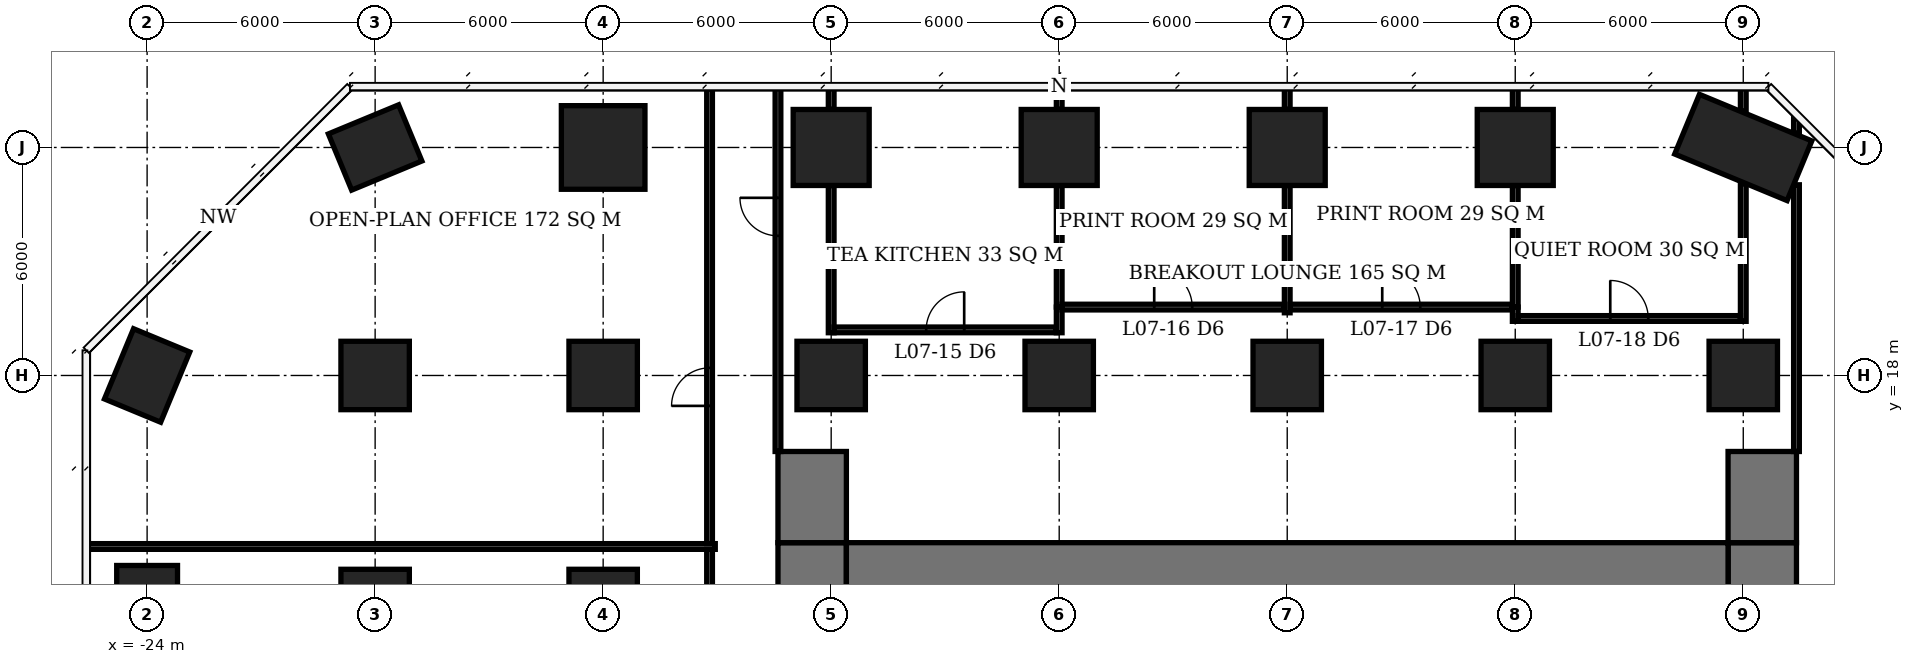
"""IFC4 building model, lengths in metres.
Left out: names, types, materials, properties, quantities, classifications, styles, units other than length and angle.
Written with IfcOpenShell. Run it as: python <this file> out.ifc"""

import sys

from ifc_helpers import new_model, si_unit, direction, frame, frame_2d, origin, origin_2d, place, context, subcontext, project, spatial, rectangle, extrude, element, fill, save


model = new_model("IFC4")
c1 = context("Model", 3, precision=1e-05, world=origin(), true_north=direction((0.0, 1.0)))
c2 = subcontext(c1, "Body", "Model", "MODEL_VIEW")
j1 = project(units=[si_unit("LENGTHUNIT", "METRE"), si_unit("PLANEANGLEUNIT", "RADIAN")], contexts=[c1])
p1 = place(None, origin())
s1 = spatial("IfcSite", under=j1, at=p1, CompositionType="ELEMENT")
p2 = place(p1, origin())
s2 = spatial("IfcBuilding", under=s1, at=p2, CompositionType="ELEMENT")
p3 = place(p2, frame((0.0, 0.0, 33.8)))
s3 = spatial("IfcBuildingStorey", under=s2, at=p3, CompositionType="ELEMENT", Elevation=33.8)
for number, where, z_axis, x_axis in (
    (1, (-24.0, 12.0, 0.0), (0.0, 0.0, 1.0), (0.0, 1.0, 0.0)),
    (2, (-24.0, 18.0, 0.0), (0.0, 0.0, 1.0), (0.383, 0.924, 0.0)),
):
    element("IfcColumn", number, at=place(p3, frame(where, z_axis=z_axis, x_axis=x_axis)), inside=s3, PredefinedType="COLUMN", context=c2, shape_type="SweptSolid", body=[
        extrude(rectangle(XDim=2.0, YDim=1.6, at=origin_2d()), origin(), (0.0, 0.0, 1.0), 3.9),
    ])
for number, where, z_axis, x_axis in (
    (3, (-18.0, 12.0, 0.0), (0.0, 0.0, 1.0), (1.0, 0.0, 0.0)),
    (4, (-18.0, 18.0, 0.0), (0.0, 0.0, 1.0), (1.0, 0.0, 0.0)),
):
    element("IfcColumn", number, at=place(p3, frame(where, z_axis=z_axis, x_axis=x_axis)), inside=s3, PredefinedType="COLUMN", context=c2, shape_type="SweptSolid", body=[
        extrude(rectangle(XDim=1.8, YDim=1.8, at=origin_2d()), origin(), (0.0, 0.0, 1.0), 3.9),
    ])
p4 = place(p3, frame((-18.0, 24.0, 0.0), z_axis=(0.0, 0.0, 1.0), x_axis=(0.923879532511, 0.382683432365, 0.0)))
e5 = element("IfcColumn", 5, at=p4, inside=s3, PredefinedType="COLUMN", context=c2, shape_type="SweptSolid", body=[
    extrude(rectangle(XDim=2.0, YDim=1.6, at=origin_2d()), origin(), (0.0, 0.0, 1.0), 3.9),
])
for number, where, z_axis, x_axis in (
    (6, (-12.0, 12.0, 0.0), (0.0, 0.0, 1.0), (1.0, 0.0, 0.0)),
    (7, (-12.0, 18.0, 0.0), (0.0, 0.0, 1.0), (1.0, 0.0, 0.0)),
):
    element("IfcColumn", number, at=place(p3, frame(where, z_axis=z_axis, x_axis=x_axis)), inside=s3, PredefinedType="COLUMN", context=c2, shape_type="SweptSolid", body=[
        extrude(rectangle(XDim=1.8, YDim=1.8, at=origin_2d()), origin(), (0.0, 0.0, 1.0), 3.9),
    ])
p5 = place(p3, frame((-12.0, 24.0, 0.0), z_axis=(0.0, 0.0, 1.0), x_axis=(1.0, 0.0, 0.0)))
e8 = element("IfcColumn", 8, at=p5, inside=s3, PredefinedType="COLUMN", context=c2, shape_type="SweptSolid", body=[
    extrude(rectangle(XDim=2.2, YDim=2.2, at=origin_2d()), origin(), (0.0, 0.0, 1.0), 3.9),
])
p6 = place(p3, frame((-6.0, 18.0, 0.0), z_axis=(0.0, 0.0, 1.0), x_axis=(1.0, 0.0, 0.0)))
e9 = element("IfcColumn", 9, at=p6, inside=s3, PredefinedType="COLUMN", context=c2, shape_type="SweptSolid", body=[
    extrude(rectangle(XDim=1.8, YDim=1.8, at=origin_2d()), origin(), (0.0, 0.0, 1.0), 3.9),
])
p7 = place(p3, frame((-6.0, 24.0, 0.0), z_axis=(0.0, 0.0, 1.0), x_axis=(1.0, 0.0, 0.0)))
e10 = element("IfcColumn", 10, at=p7, inside=s3, PredefinedType="COLUMN", context=c2, shape_type="SweptSolid", body=[
    extrude(rectangle(XDim=2.0, YDim=2.0, at=origin_2d()), origin(), (0.0, 0.0, 1.0), 3.9),
])
p8 = place(p3, frame((0.0, 18.0, 0.0), z_axis=(0.0, 0.0, 1.0), x_axis=(1.0, 0.0, 0.0)))
e11 = element("IfcColumn", 11, at=p8, inside=s3, PredefinedType="COLUMN", context=c2, shape_type="SweptSolid", body=[
    extrude(rectangle(XDim=1.8, YDim=1.8, at=origin_2d()), origin(), (0.0, 0.0, 1.0), 3.9),
])
p9 = place(p3, frame((0.0, 24.0, 0.0), z_axis=(0.0, 0.0, 1.0), x_axis=(1.0, 0.0, 0.0)))
e12 = element("IfcColumn", 12, at=p9, inside=s3, PredefinedType="COLUMN", context=c2, shape_type="SweptSolid", body=[
    extrude(rectangle(XDim=2.0, YDim=2.0, at=origin_2d()), origin(), (0.0, 0.0, 1.0), 3.9),
])
p10 = place(p3, frame((6.0, 18.0, 0.0), z_axis=(0.0, 0.0, 1.0), x_axis=(1.0, 0.0, 0.0)))
e13 = element("IfcColumn", 13, at=p10, inside=s3, PredefinedType="COLUMN", context=c2, shape_type="SweptSolid", body=[
    extrude(rectangle(XDim=1.8, YDim=1.8, at=origin_2d()), origin(), (0.0, 0.0, 1.0), 3.9),
])
p11 = place(p3, frame((6.0, 24.0, 0.0), z_axis=(0.0, 0.0, 1.0), x_axis=(1.0, 0.0, 0.0)))
e14 = element("IfcColumn", 14, at=p11, inside=s3, PredefinedType="COLUMN", context=c2, shape_type="SweptSolid", body=[
    extrude(rectangle(XDim=2.0, YDim=2.0, at=origin_2d()), origin(), (0.0, 0.0, 1.0), 3.9),
])
p12 = place(p3, frame((12.0, 18.0, 0.0), z_axis=(0.0, 0.0, 1.0), x_axis=(1.0, 0.0, 0.0)))
e15 = element("IfcColumn", 15, at=p12, inside=s3, PredefinedType="COLUMN", context=c2, shape_type="SweptSolid", body=[
    extrude(rectangle(XDim=1.8, YDim=1.8, at=origin_2d()), origin(), (0.0, 0.0, 1.0), 3.9),
])
p13 = place(p3, frame((12.0, 24.0, 0.0), z_axis=(0.0, 0.0, 1.0), x_axis=(1.0, 0.0, 0.0)))
e16 = element("IfcColumn", 16, at=p13, inside=s3, PredefinedType="COLUMN", context=c2, shape_type="SweptSolid", body=[
    extrude(rectangle(XDim=2.0, YDim=2.0, at=origin_2d()), origin(), (0.0, 0.0, 1.0), 3.9),
])
p14 = place(p3, frame((18.0, 18.0, 0.0), z_axis=(0.0, 0.0, 1.0), x_axis=(1.0, 0.0, 0.0)))
e17 = element("IfcColumn", 17, at=p14, inside=s3, PredefinedType="COLUMN", context=c2, shape_type="SweptSolid", body=[
    extrude(rectangle(XDim=1.8, YDim=1.8, at=origin_2d()), origin(), (0.0, 0.0, 1.0), 3.9),
])
p15 = place(p3, frame((18.0, 24.0, 0.0), z_axis=(0.0, 0.0, 1.0), x_axis=(0.923879532511, -0.382683432365, 0.0)))
e18 = element("IfcColumn", 18, at=p15, inside=s3, PredefinedType="COLUMN", context=c2, shape_type="SweptSolid", body=[
    extrude(rectangle(XDim=3.2, YDim=1.7, at=origin_2d()), origin(), (0.0, 0.0, 1.0), 3.9),
])
p16 = place(p3, frame((-5.6, 12.6, 0.0), z_axis=(0.0, 0.0, 1.0), x_axis=(1.0, 0.0, 0.0)))
e19 = element("IfcWall", 19, at=p16, inside=s3, PredefinedType="SHEAR", context=c2, shape_type="SweptSolid", body=[
    extrude(rectangle(XDim=23.2, YDim=2.0, at=frame_2d((11.6, 0.0))), origin(), (0.0, 0.0, 1.0), 3.9),
])
p17 = place(p3, frame((-6.5, -7.6, 0.0), z_axis=(0.0, 0.0, 1.0), x_axis=(0.0, 1.0, 0.0)))
e20 = element("IfcWall", 20, at=p17, inside=s3, PredefinedType="SHEAR", context=c2, shape_type="SweptSolid", body=[
    extrude(rectangle(XDim=21.2, YDim=1.8, at=frame_2d((10.6, 0.0))), origin(), (0.0, 0.0, 1.0), 3.9),
])
p18 = place(p17, frame((7.8, 0.0, 0.0)))
e21 = element("IfcOpeningElement", 21, at=p18, cuts=e20, PredefinedType="OPENING", context=c2, shape_type="SweptSolid", body=[
    extrude(rectangle(XDim=1.8, YDim=2.4, at=frame_2d((0.9, 1.2))), frame((0.0, 0.91, 0.0), z_axis=(0.0, -1.0, 0.0), x_axis=(1.0, 0.0, 0.0)), (0.0, 0.0, 1.0), 1.82),
])
p19 = place(p3, frame((18.5, -7.6, 0.0), z_axis=(0.0, 0.0, 1.0), x_axis=(0.0, 1.0, 0.0)))
e22 = element("IfcWall", 22, at=p19, inside=s3, PredefinedType="SHEAR", context=c2, shape_type="SweptSolid", body=[
    extrude(rectangle(XDim=21.2, YDim=1.8, at=frame_2d((10.6, 0.0))), origin(), (0.0, 0.0, 1.0), 3.9),
])
p20 = place(p19, frame((9.2, 0.0, 0.0)))
e23 = element("IfcOpeningElement", 23, at=p20, cuts=e22, PredefinedType="OPENING", context=c2, shape_type="SweptSolid", body=[
    extrude(rectangle(XDim=1.8, YDim=2.4, at=frame_2d((0.9, 1.2))), frame((0.0, 0.91, 0.0), z_axis=(0.0, -1.0, 0.0), x_axis=(1.0, 0.0, 0.0)), (0.0, 0.0, 1.0), 1.82),
])
for number, where, z_axis, x_axis in (
    (24, (-6.5, 13.6, 0.0), (0.0, 0.0, 1.0), (0.0, 1.0, 0.0)),
    (25, (18.5, 13.6, 0.0), (0.0, 0.0, 1.0), (0.0, 1.0, 0.0)),
):
    element("IfcWall", number, at=place(p3, frame(where, z_axis=z_axis, x_axis=x_axis)), inside=s3, PredefinedType="SHEAR", context=c2, shape_type="SweptSolid", body=[
        extrude(rectangle(XDim=2.4, YDim=1.8, at=frame_2d((1.2, 0.0))), origin(), (0.0, 0.0, 1.0), 3.9),
    ])
p21 = place(p3, frame((-5.925, 19.2, 0.0), z_axis=(0.0, 0.0, 1.0), x_axis=(1.0, 0.0, 0.0)))
e26 = element("IfcWall", 26, at=p21, inside=s3, PredefinedType="PARTITIONING", context=c2, shape_type="SweptSolid", body=[
    extrude(rectangle(XDim=5.85, YDim=0.15, at=frame_2d((2.925, 0.0))), origin(), (0.0, 0.0, 1.0), 3.65),
])
p22 = place(p21, frame((2.425, 0.0, 0.0)))
e27 = element("IfcOpeningElement", 27, at=p22, cuts=e26, PredefinedType="OPENING", context=c2, shape_type="SweptSolid", body=[
    extrude(rectangle(XDim=1.0, YDim=2.1, at=frame_2d((0.5, 1.05))), frame((0.0, 0.085, 0.0), z_axis=(0.0, -1.0, 0.0), x_axis=(1.0, 0.0, 0.0)), (0.0, 0.0, 1.0), 0.17),
])
p23 = place(p3, frame((12.075, 19.5, 0.0), z_axis=(0.0, 0.0, 1.0), x_axis=(1.0, 0.0, 0.0)))
e28 = element("IfcWall", 28, at=p23, inside=s3, PredefinedType="PARTITIONING", context=c2, shape_type="SweptSolid", body=[
    extrude(rectangle(XDim=5.85, YDim=0.15, at=frame_2d((2.925, 0.0))), origin(), (0.0, 0.0, 1.0), 3.65),
])
p24 = place(p23, frame((2.425, 0.0, 0.0)))
e29 = element("IfcOpeningElement", 29, at=p24, cuts=e28, PredefinedType="OPENING", context=c2, shape_type="SweptSolid", body=[
    extrude(rectangle(XDim=1.0, YDim=2.1, at=frame_2d((0.5, 1.05))), frame((0.0, 0.085, 0.0), z_axis=(0.0, -1.0, 0.0), x_axis=(1.0, 0.0, 0.0)), (0.0, 0.0, 1.0), 0.17),
])
p25 = place(p3, frame((0.075, 19.8, 0.0), z_axis=(0.0, 0.0, 1.0), x_axis=(1.0, 0.0, 0.0)))
e30 = element("IfcWall", 30, at=p25, inside=s3, PredefinedType="PARTITIONING", context=c2, shape_type="SweptSolid", body=[
    extrude(rectangle(XDim=5.85, YDim=0.15, at=frame_2d((2.925, 0.0))), origin(), (0.0, 0.0, 1.0), 3.65),
])
p26 = place(p25, frame((2.425, 0.0, 0.0)))
e31 = element("IfcOpeningElement", 31, at=p26, cuts=e30, PredefinedType="OPENING", context=c2, shape_type="SweptSolid", body=[
    extrude(rectangle(XDim=1.0, YDim=2.1, at=frame_2d((0.5, 1.05))), frame((0.0, 0.085, 0.0), z_axis=(0.0, -1.0, 0.0), x_axis=(1.0, 0.0, 0.0)), (0.0, 0.0, 1.0), 0.17),
])
p27 = place(p3, frame((6.075, 19.8, 0.0), z_axis=(0.0, 0.0, 1.0), x_axis=(1.0, 0.0, 0.0)))
e32 = element("IfcWall", 32, at=p27, inside=s3, PredefinedType="PARTITIONING", context=c2, shape_type="SweptSolid", body=[
    extrude(rectangle(XDim=5.85, YDim=0.15, at=frame_2d((2.925, 0.0))), origin(), (0.0, 0.0, 1.0), 3.65),
])
p28 = place(p27, frame((2.425, 0.0, 0.0)))
e33 = element("IfcOpeningElement", 33, at=p28, cuts=e32, PredefinedType="OPENING", context=c2, shape_type="SweptSolid", body=[
    extrude(rectangle(XDim=1.0, YDim=2.1, at=frame_2d((0.5, 1.05))), frame((0.0, 0.085, 0.0), z_axis=(0.0, -1.0, 0.0), x_axis=(1.0, 0.0, 0.0)), (0.0, 0.0, 1.0), 0.17),
])
p29 = place(p3, frame((-6.0, 19.125, 0.0), z_axis=(0.0, 0.0, 1.0), x_axis=(0.0, 1.0, 0.0)))
e34 = element("IfcWall", 34, at=p29, inside=s3, PredefinedType="PARTITIONING", context=c2, shape_type="SweptSolid", body=[
    extrude(rectangle(XDim=3.875, YDim=0.15, at=frame_2d((1.938, 0.0))), origin(), (0.0, 0.0, 1.0), 3.65),
])
p30 = place(p3, frame((-6.0, 25.0, 0.0), z_axis=(0.0, 0.0, 1.0), x_axis=(0.0, 1.0, 0.0)))
e35 = element("IfcWall", 35, at=p30, inside=s3, PredefinedType="PARTITIONING", context=c2, shape_type="SweptSolid", body=[
    extrude(rectangle(XDim=0.6, YDim=0.15, at=frame_2d((0.3, 0.0))), origin(), (0.0, 0.0, 1.0), 3.65),
])
p31 = place(p3, frame((0.0, 19.125, 0.0), z_axis=(0.0, 0.0, 1.0), x_axis=(0.0, 1.0, 0.0)))
e36 = element("IfcWall", 36, at=p31, inside=s3, PredefinedType="PARTITIONING", context=c2, shape_type="SweptSolid", body=[
    extrude(rectangle(XDim=0.675, YDim=0.15, at=frame_2d((0.337, 0.0))), origin(), (0.0, 0.0, 1.0), 3.65),
])
p32 = place(p3, frame((0.0, 19.8, 0.0), z_axis=(0.0, 0.0, 1.0), x_axis=(0.0, 1.0, 0.0)))
e37 = element("IfcWall", 37, at=p32, inside=s3, PredefinedType="PARTITIONING", context=c2, shape_type="SweptSolid", body=[
    extrude(rectangle(XDim=3.2, YDim=0.15, at=frame_2d((1.6, 0.0))), origin(), (0.0, 0.0, 1.0), 3.65),
])
p33 = place(p3, frame((0.0, 25.0, 0.0), z_axis=(0.0, 0.0, 1.0), x_axis=(0.0, 1.0, 0.0)))
e38 = element("IfcWall", 38, at=p33, inside=s3, PredefinedType="PARTITIONING", context=c2, shape_type="SweptSolid", body=[
    extrude(rectangle(XDim=0.55, YDim=0.15, at=frame_2d((0.275, 0.0))), origin(), (0.0, 0.0, 1.0), 3.65),
])
p34 = place(p3, frame((6.0, 19.65, 0.0), z_axis=(0.0, 0.0, 1.0), x_axis=(0.0, 1.0, 0.0)))
e39 = element("IfcWall", 39, at=p34, inside=s3, PredefinedType="PARTITIONING", context=c2, shape_type="SweptSolid", body=[
    extrude(rectangle(XDim=3.35, YDim=0.15, at=frame_2d((1.675, 0.0))), origin(), (0.0, 0.0, 1.0), 3.65),
])
p35 = place(p3, frame((6.0, 25.0, 0.0), z_axis=(0.0, 0.0, 1.0), x_axis=(0.0, 1.0, 0.0)))
e40 = element("IfcWall", 40, at=p35, inside=s3, PredefinedType="PARTITIONING", context=c2, shape_type="SweptSolid", body=[
    extrude(rectangle(XDim=0.6, YDim=0.15, at=frame_2d((0.3, 0.0))), origin(), (0.0, 0.0, 1.0), 3.65),
])
p36 = place(p3, frame((12.0, 19.425, 0.0), z_axis=(0.0, 0.0, 1.0), x_axis=(0.0, 1.0, 0.0)))
e41 = element("IfcWall", 41, at=p36, inside=s3, PredefinedType="PARTITIONING", context=c2, shape_type="SweptSolid", body=[
    extrude(rectangle(XDim=0.375, YDim=0.15, at=frame_2d((0.188, 0.0))), origin(), (0.0, 0.0, 1.0), 3.65),
])
p37 = place(p3, frame((12.0, 19.8, 0.0), z_axis=(0.0, 0.0, 1.0), x_axis=(0.0, 1.0, 0.0)))
e42 = element("IfcWall", 42, at=p37, inside=s3, PredefinedType="PARTITIONING", context=c2, shape_type="SweptSolid", body=[
    extrude(rectangle(XDim=3.2, YDim=0.15, at=frame_2d((1.6, 0.0))), origin(), (0.0, 0.0, 1.0), 3.65),
])
p38 = place(p3, frame((12.0, 25.0, 0.0), z_axis=(0.0, 0.0, 1.0), x_axis=(0.0, 1.0, 0.0)))
e43 = element("IfcWall", 43, at=p38, inside=s3, PredefinedType="PARTITIONING", context=c2, shape_type="SweptSolid", body=[
    extrude(rectangle(XDim=0.6, YDim=0.15, at=frame_2d((0.3, 0.0))), origin(), (0.0, 0.0, 1.0), 3.65),
])
p39 = place(p3, frame((18.0, 19.425, 0.0), z_axis=(0.0, 0.0, 1.0), x_axis=(0.0, 1.0, 0.0)))
e44 = element("IfcWall", 44, at=p39, inside=s3, PredefinedType="PARTITIONING", context=c2, shape_type="SweptSolid", body=[
    extrude(rectangle(XDim=3.624, YDim=0.15, at=frame_2d((1.812, 0.0))), origin(), (0.0, 0.0, 1.0), 3.65),
])
p40 = place(p3, frame((18.0, 24.951, 0.0), z_axis=(0.0, 0.0, 1.0), x_axis=(0.0, 1.0, 0.0)))
e45 = element("IfcWall", 45, at=p40, inside=s3, PredefinedType="PARTITIONING", context=c2, shape_type="SweptSolid", body=[
    extrude(rectangle(XDim=0.649, YDim=0.15, at=frame_2d((0.324, 0.0))), origin(), (0.0, 0.0, 1.0), 3.65),
])
p41 = place(p3, frame((-25.6, 13.5, 0.0), z_axis=(0.0, 0.0, 1.0), x_axis=(1.0, 0.0, 0.0)))
e46 = element("IfcWall", 46, at=p41, inside=s3, PredefinedType="PARTITIONING", context=c2, shape_type="SweptSolid", body=[
    extrude(rectangle(XDim=16.55, YDim=0.15, at=frame_2d((8.275, 0.0))), origin(), (0.0, 0.0, 1.0), 3.65),
])
p42 = place(p3, frame((-9.2, -4.425, 0.0), z_axis=(0.0, 0.0, 1.0), x_axis=(0.0, 1.0, 0.0)))
e47 = element("IfcWall", 47, at=p42, inside=s3, PredefinedType="PARTITIONING", context=c2, shape_type="SweptSolid", body=[
    extrude(rectangle(XDim=17.85, YDim=0.15, at=frame_2d((8.925, 0.0))), origin(), (0.0, 0.0, 1.0), 3.65),
])
p43 = place(p42, frame((5.725, 0.0, 0.0)))
e48 = element("IfcOpeningElement", 48, at=p43, cuts=e47, PredefinedType="OPENING", context=c2, shape_type="SweptSolid", body=[
    extrude(rectangle(XDim=1.0, YDim=2.1, at=frame_2d((0.5, 1.05))), frame((0.0, 0.085, 0.0), z_axis=(0.0, -1.0, 0.0), x_axis=(1.0, 0.0, 0.0)), (0.0, 0.0, 1.0), 0.17),
])
p44 = place(p3, frame((-9.2, 13.575, 0.0), z_axis=(0.0, 0.0, 1.0), x_axis=(0.0, 1.0, 0.0)))
e49 = element("IfcWall", 49, at=p44, inside=s3, PredefinedType="PARTITIONING", context=c2, shape_type="SweptSolid", body=[
    extrude(rectangle(XDim=11.975, YDim=0.15, at=frame_2d((5.988, 0.0))), origin(), (0.0, 0.0, 1.0), 3.65),
])
p45 = place(p44, frame((3.625, 0.0, 0.0)))
e50 = element("IfcOpeningElement", 50, at=p45, cuts=e49, PredefinedType="OPENING", context=c2, shape_type="SweptSolid", body=[
    extrude(rectangle(XDim=1.0, YDim=2.1, at=frame_2d((0.5, 1.05))), frame((0.0, 0.085, 0.0), z_axis=(0.0, -1.0, 0.0), x_axis=(1.0, 0.0, 0.0)), (0.0, 0.0, 1.0), 0.17),
])
p46 = place(p3, frame((-7.4, 16.0, 0.0), z_axis=(0.0, 0.0, 1.0), x_axis=(0.0, 1.0, 0.0)))
e51 = element("IfcWall", 51, at=p46, inside=s3, PredefinedType="PARTITIONING", context=c2, shape_type="SweptSolid", body=[
    extrude(rectangle(XDim=9.6, YDim=0.15, at=frame_2d((4.8, 0.0))), origin(), (0.0, 0.0, 1.0), 3.65),
])
p47 = place(p46, frame((5.675, 0.0, 0.0)))
e52 = element("IfcOpeningElement", 52, at=p47, cuts=e51, PredefinedType="OPENING", context=c2, shape_type="SweptSolid", body=[
    extrude(rectangle(XDim=1.0, YDim=2.1, at=frame_2d((0.5, 1.05))), frame((0.0, 0.085, 0.0), z_axis=(0.0, -1.0, 0.0), x_axis=(1.0, 0.0, 0.0)), (0.0, 0.0, 1.0), 0.17),
])
p48 = place(p3, frame((19.4, 16.0, 0.0), z_axis=(0.0, 0.0, 1.0), x_axis=(0.0, 1.0, 0.0)))
e53 = element("IfcWall", 53, at=p48, inside=s3, PredefinedType="PARTITIONING", context=c2, shape_type="SweptSolid", body=[
    extrude(rectangle(XDim=7.018, YDim=0.15, at=frame_2d((3.509, 0.0))), origin(), (0.0, 0.0, 1.0), 3.65),
])
p49 = place(p3, frame((19.4, 24.371, 0.0), z_axis=(0.0, 0.0, 1.0), x_axis=(0.0, 1.0, 0.0)))
e54 = element("IfcWall", 54, at=p49, inside=s3, PredefinedType="PARTITIONING", context=c2, shape_type="SweptSolid", body=[
    extrude(rectangle(XDim=0.4, YDim=0.15, at=frame_2d((0.2, 0.0))), origin(), (0.0, 0.0, 1.0), 3.65),
])
p50 = place(p22, origin())
e55 = element("IfcDoor", 55, at=p50, inside=s3, OperationType="SINGLE_SWING_RIGHT", PredefinedType="DOOR", context=c2, shape_type="SweptSolid", body=[
    extrude(rectangle(XDim=1.0, YDim=2.1, at=frame_2d((0.5, 1.05))), frame((0.0, 0.025, 0.0), z_axis=(0.0, -1.0, 0.0), x_axis=(1.0, 0.0, 0.0)), (0.0, 0.0, 1.0), 0.05),
])
fill(e27, e55)
p51 = place(p26, origin())
e56 = element("IfcDoor", 56, at=p51, inside=s3, OperationType="SINGLE_SWING_LEFT", PredefinedType="DOOR", context=c2, shape_type="SweptSolid", body=[
    extrude(rectangle(XDim=1.0, YDim=2.1, at=frame_2d((0.5, 1.05))), frame((0.0, 0.025, 0.0), z_axis=(0.0, -1.0, 0.0), x_axis=(1.0, 0.0, 0.0)), (0.0, 0.0, 1.0), 0.05),
])
fill(e31, e56)
p52 = place(p28, origin())
e57 = element("IfcDoor", 57, at=p52, inside=s3, OperationType="SINGLE_SWING_LEFT", PredefinedType="DOOR", context=c2, shape_type="SweptSolid", body=[
    extrude(rectangle(XDim=1.0, YDim=2.1, at=frame_2d((0.5, 1.05))), frame((0.0, 0.025, 0.0), z_axis=(0.0, -1.0, 0.0), x_axis=(1.0, 0.0, 0.0)), (0.0, 0.0, 1.0), 0.05),
])
fill(e33, e57)
p53 = place(p24, origin())
e58 = element("IfcDoor", 58, at=p53, inside=s3, OperationType="SINGLE_SWING_LEFT", PredefinedType="DOOR", context=c2, shape_type="SweptSolid", body=[
    extrude(rectangle(XDim=1.0, YDim=2.1, at=frame_2d((0.5, 1.05))), frame((0.0, 0.025, 0.0), z_axis=(0.0, -1.0, 0.0), x_axis=(1.0, 0.0, 0.0)), (0.0, 0.0, 1.0), 0.05),
])
fill(e29, e58)
p54 = place(p47, origin())
e59 = element("IfcDoor", 59, at=p54, inside=s3, OperationType="SINGLE_SWING_RIGHT", PredefinedType="DOOR", context=c2, shape_type="SweptSolid", body=[
    extrude(rectangle(XDim=1.0, YDim=2.1, at=frame_2d((0.5, 1.05))), frame((0.0, 0.025, 0.0), z_axis=(0.0, -1.0, 0.0), x_axis=(1.0, 0.0, 0.0)), (0.0, 0.0, 1.0), 0.05),
])
fill(e52, e59)
p55 = place(p45, origin())
e60 = element("IfcDoor", 60, at=p55, inside=s3, OperationType="SINGLE_SWING_LEFT", PredefinedType="DOOR", context=c2, shape_type="SweptSolid", body=[
    extrude(rectangle(XDim=1.0, YDim=2.1, at=frame_2d((0.5, 1.05))), frame((0.0, 0.025, 0.0), z_axis=(0.0, -1.0, 0.0), x_axis=(1.0, 0.0, 0.0)), (0.0, 0.0, 1.0), 0.05),
])
fill(e50, e60)
save(model, sys.argv[1])
